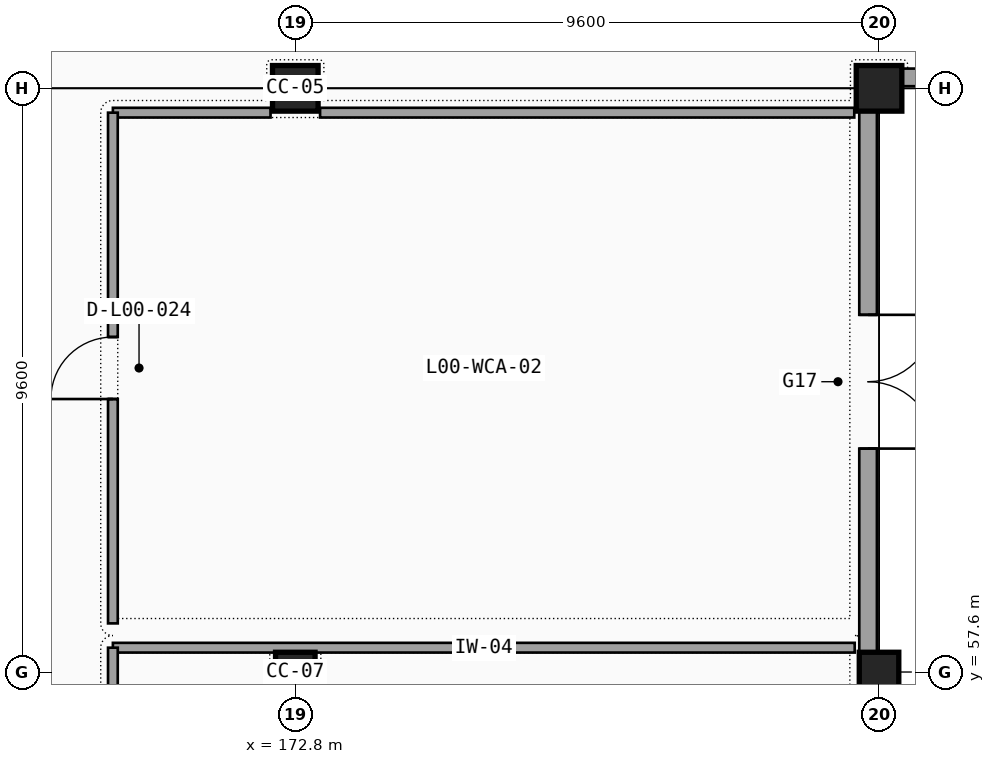
"""IFC4 building model, lengths in metres.
Left out: names, types, materials, properties, quantities, classifications, styles, units other than length and angle.
Written with IfcOpenShell. Run it as: python <this file> out.ifc"""

import sys

from ifc_helpers import new_model, si_unit, direction, frame, frame_2d, origin, origin_2d, place, context, subcontext, project, spatial, rectangle, extrude, element, fill, save


model = new_model("IFC4")
c1 = context("Model", 3, precision=1e-05, world=origin(), true_north=direction((0.0, 1.0)))
c2 = subcontext(c1, "Body", "Model", "MODEL_VIEW")
j1 = project(units=[si_unit("LENGTHUNIT", "METRE"), si_unit("PLANEANGLEUNIT", "RADIAN")], contexts=[c1])
p1 = place(None, origin())
s1 = spatial("IfcSite", under=j1, at=p1, CompositionType="ELEMENT")
p2 = place(p1, origin())
s2 = spatial("IfcBuilding", under=s1, at=p2, CompositionType="ELEMENT")
p3 = place(p2, origin())
s3 = spatial("IfcBuildingStorey", under=s2, at=p3, CompositionType="ELEMENT", Elevation=0.0)
p4 = place(p3, frame((172.8, 57.6, 0.0), z_axis=(0.0, 0.0, 1.0), x_axis=(1.0, 0.0, 0.0)))
e1 = element("IfcColumn", 1, at=p4, inside=s3, PredefinedType="COLUMN", context=c2, shape_type="SweptSolid", body=[
    extrude(rectangle(XDim=0.65, YDim=0.65, at=origin_2d()), origin(), (0.0, 0.0, 1.0), 4.8),
])
p5 = place(p3, frame((172.8, 67.2, 0.0), z_axis=(0.0, 0.0, 1.0), x_axis=(1.0, 0.0, 0.0)))
e2 = element("IfcColumn", 2, at=p5, inside=s3, PredefinedType="COLUMN", context=c2, shape_type="SweptSolid", body=[
    extrude(rectangle(XDim=0.75, YDim=0.75, at=origin_2d()), origin(), (0.0, 0.0, 1.0), 4.8),
])
p6 = place(p3, frame((182.4, 57.6, 0.0), z_axis=(0.0, 0.0, 1.0), x_axis=(1.0, 0.0, 0.0)))
e3 = element("IfcColumn", 3, at=p6, inside=s3, PredefinedType="COLUMN", context=c2, shape_type="SweptSolid", body=[
    extrude(rectangle(XDim=0.65, YDim=0.65, at=origin_2d()), origin(), (0.0, 0.0, 1.0), 4.8),
])
p7 = place(p3, frame((182.4, 67.2, 0.0), z_axis=(0.0, 0.0, 1.0), x_axis=(1.0, 0.0, 0.0)))
e4 = element("IfcColumn", 4, at=p7, inside=s3, PredefinedType="COLUMN", context=c2, shape_type="SweptSolid", body=[
    extrude(rectangle(XDim=0.75, YDim=0.75, at=origin_2d()), origin(), (0.0, 0.0, 1.0), 4.8),
])
p8 = place(p3, frame((182.22, 48.0, 0.0), z_axis=(0.0, 0.0, 1.0), x_axis=(0.0, 1.0, 0.0)))
e5 = element("IfcWall", 5, at=p8, inside=s3, PredefinedType="SOLIDWALL", context=c2, shape_type="SweptSolid", body=[
    extrude(rectangle(XDim=9.6, YDim=0.29, at=frame_2d((4.8, 0.0))), origin(), (0.0, 0.0, 1.0), 3.7),
])
p9 = place(p8, frame((4.067, 0.0, 1.0), z_axis=(0.0, 0.0, 1.0), x_axis=(-1.0, 0.0, 0.0)))
e6 = element("IfcOpeningElement", 6, at=p9, cuts=e5, PredefinedType="OPENING", context=c2, shape_type="SweptSolid", body=[
    extrude(rectangle(XDim=2.6, YDim=2.0, at=frame_2d((1.3, 1.0))), frame((0.0, 0.155, 0.0), z_axis=(0.0, -1.0, 0.0), x_axis=(1.0, 0.0, 0.0)), (0.0, 0.0, 1.0), 0.31),
])
p10 = place(p8, frame((8.133, 0.0, 1.0), z_axis=(0.0, 0.0, 1.0), x_axis=(-1.0, 0.0, 0.0)))
e7 = element("IfcOpeningElement", 7, at=p10, cuts=e5, PredefinedType="OPENING", context=c2, shape_type="SweptSolid", body=[
    extrude(rectangle(XDim=2.6, YDim=2.0, at=frame_2d((1.3, 1.0))), frame((0.0, 0.155, 0.0), z_axis=(0.0, -1.0, 0.0), x_axis=(1.0, 0.0, 0.0)), (0.0, 0.0, 1.0), 0.31),
])
p11 = place(p3, frame((182.22, 57.6, 0.0), z_axis=(0.0, 0.0, 1.0), x_axis=(0.0, 1.0, 0.0)))
e8 = element("IfcWall", 8, at=p11, inside=s3, PredefinedType="SOLIDWALL", context=c2, shape_type="SweptSolid", body=[
    extrude(rectangle(XDim=9.245, YDim=0.29, at=frame_2d((4.623, 0.0))), origin(), (0.0, 0.0, 1.0), 3.7),
])
p12 = place(p11, frame((5.875, 0.0, 0.0), z_axis=(0.0, 0.0, 1.0), x_axis=(-1.0, 0.0, 0.0)))
e9 = element("IfcOpeningElement", 9, at=p12, cuts=e8, PredefinedType="OPENING", context=c2, shape_type="SweptSolid", body=[
    extrude(rectangle(XDim=2.2, YDim=2.4, at=frame_2d((1.1, 1.2))), frame((0.0, 0.155, 0.0), z_axis=(0.0, -1.0, 0.0), x_axis=(1.0, 0.0, 0.0)), (0.0, 0.0, 1.0), 0.31),
])
p13 = place(p3, frame((182.755, 67.38, 0.0), z_axis=(0.0, 0.0, 1.0), x_axis=(1.0, 0.0, 0.0)))
e10 = element("IfcWall", 10, at=p13, inside=s3, PredefinedType="SOLIDWALL", context=c2, shape_type="SweptSolid", body=[
    extrude(rectangle(XDim=8.89, YDim=0.29, at=frame_2d((4.445, 0.0))), origin(), (0.0, 0.0, 1.0), 3.664),
])
p14 = place(p13, frame((3.83, 0.0, 1.0), z_axis=(0.0, 0.0, 1.0), x_axis=(-1.0, 0.0, 0.0)))
e11 = element("IfcOpeningElement", 11, at=p14, cuts=e10, PredefinedType="OPENING", context=c2, shape_type="SweptSolid", body=[
    extrude(rectangle(XDim=2.6, YDim=2.0, at=frame_2d((1.3, 1.0))), frame((0.0, 0.155, 0.0), z_axis=(0.0, -1.0, 0.0), x_axis=(1.0, 0.0, 0.0)), (0.0, 0.0, 1.0), 0.31),
])
p15 = place(p13, frame((7.66, 0.0, 1.0), z_axis=(0.0, 0.0, 1.0), x_axis=(-1.0, 0.0, 0.0)))
e12 = element("IfcOpeningElement", 12, at=p15, cuts=e10, PredefinedType="OPENING", context=c2, shape_type="SweptSolid", body=[
    extrude(rectangle(XDim=2.6, YDim=2.0, at=frame_2d((1.3, 1.0))), frame((0.0, 0.155, 0.0), z_axis=(0.0, -1.0, 0.0), x_axis=(1.0, 0.0, 0.0)), (0.0, 0.0, 1.0), 0.31),
])
p16 = place(p3, frame((169.8, 58.0, 0.0), z_axis=(0.0, 0.0, 1.0), x_axis=(1.0, 0.0, 0.0)))
e13 = element("IfcWall", 13, at=p16, inside=s3, PredefinedType="PARTITIONING", context=c2, shape_type="SweptSolid", body=[
    extrude(rectangle(XDim=12.2, YDim=0.16, at=frame_2d((6.1, 0.0))), origin(), (0.0, 0.0, 1.0), 3.7),
])
p17 = place(p3, frame((169.8, 48.5, 0.0), z_axis=(0.0, 0.0, 1.0), x_axis=(0.0, 1.0, 0.0)))
e14 = element("IfcWall", 14, at=p17, inside=s3, PredefinedType="PARTITIONING", context=c2, shape_type="SweptSolid", body=[
    extrude(rectangle(XDim=9.5, YDim=0.16, at=frame_2d((4.75, 0.0))), origin(), (0.0, 0.0, 1.0), 3.664),
])
p18 = place(p17, frame((4.29, 0.0, 0.0), z_axis=(0.0, 0.0, 1.0), x_axis=(1.0, 0.0, 0.0)))
e15 = element("IfcOpeningElement", 15, at=p18, cuts=e14, PredefinedType="OPENING", context=c2, shape_type="SweptSolid", body=[
    extrude(rectangle(XDim=0.92, YDim=2.12, at=frame_2d((0.46, 1.06))), frame((0.0, 0.09, 0.0), z_axis=(0.0, -1.0, 0.0), x_axis=(1.0, 0.0, 0.0)), (0.0, 0.0, 1.0), 0.18),
])
p19 = place(p3, frame((169.8, 66.8, 0.0), z_axis=(0.0, 0.0, 1.0), x_axis=(1.0, 0.0, 0.0)))
e16 = element("IfcWall", 16, at=p19, inside=s3, PredefinedType="PARTITIONING", context=c2, shape_type="SweptSolid", body=[
    extrude(rectangle(XDim=2.593, YDim=0.16, at=frame_2d((1.296, 0.0))), origin(), (0.0, 0.0, 1.0), 4.5),
])
p20 = place(p3, frame((173.207, 66.8, 0.0), z_axis=(0.0, 0.0, 1.0), x_axis=(1.0, 0.0, 0.0)))
e17 = element("IfcWall", 17, at=p20, inside=s3, PredefinedType="PARTITIONING", context=c2, shape_type="SweptSolid", body=[
    extrude(rectangle(XDim=8.785, YDim=0.16, at=frame_2d((4.393, 0.0))), origin(), (0.0, 0.0, 1.0), 4.5),
])
p21 = place(p3, frame((169.8, 58.4, 0.0), z_axis=(0.0, 0.0, 1.0), x_axis=(0.0, 1.0, 0.0)))
e18 = element("IfcWall", 18, at=p21, inside=s3, PredefinedType="PARTITIONING", context=c2, shape_type="SweptSolid", body=[
    extrude(rectangle(XDim=8.4, YDim=0.16, at=frame_2d((4.2, 0.0))), origin(), (0.0, 0.0, 1.0), 3.972),
])
p22 = place(p21, frame((3.69, 0.0, 0.0), z_axis=(0.0, 0.0, 1.0), x_axis=(1.0, 0.0, 0.0)))
e19 = element("IfcOpeningElement", 19, at=p22, cuts=e18, PredefinedType="OPENING", context=c2, shape_type="SweptSolid", body=[
    extrude(rectangle(XDim=1.02, YDim=2.15, at=frame_2d((0.51, 1.075))), frame((0.0, 0.09, 0.0), z_axis=(0.0, -1.0, 0.0), x_axis=(1.0, 0.0, 0.0)), (0.0, 0.0, 1.0), 0.18),
])
p23 = place(p12, origin())
e20 = element("IfcDoor", 20, at=p23, inside=s3, OperationType="DOUBLE_DOOR_SINGLE_SWING", PredefinedType="DOOR", context=c2, shape_type="SweptSolid", body=[
    extrude(rectangle(XDim=2.2, YDim=2.4, at=frame_2d((1.1, 1.2))), frame((0.0, 0.025, 0.0), z_axis=(0.0, -1.0, 0.0), x_axis=(1.0, 0.0, 0.0)), (0.0, 0.0, 1.0), 0.05),
])
fill(e9, e20)
p24 = place(p22, origin())
e21 = element("IfcDoor", 21, at=p24, inside=s3, OperationType="SINGLE_SWING_LEFT", PredefinedType="DOOR", context=c2, shape_type="SweptSolid", body=[
    extrude(rectangle(XDim=1.02, YDim=2.15, at=frame_2d((0.51, 1.075))), frame((0.0, 0.025, 0.0), z_axis=(0.0, -1.0, 0.0), x_axis=(1.0, 0.0, 0.0)), (0.0, 0.0, 1.0), 0.05),
])
fill(e19, e21)
save(model, sys.argv[1])
